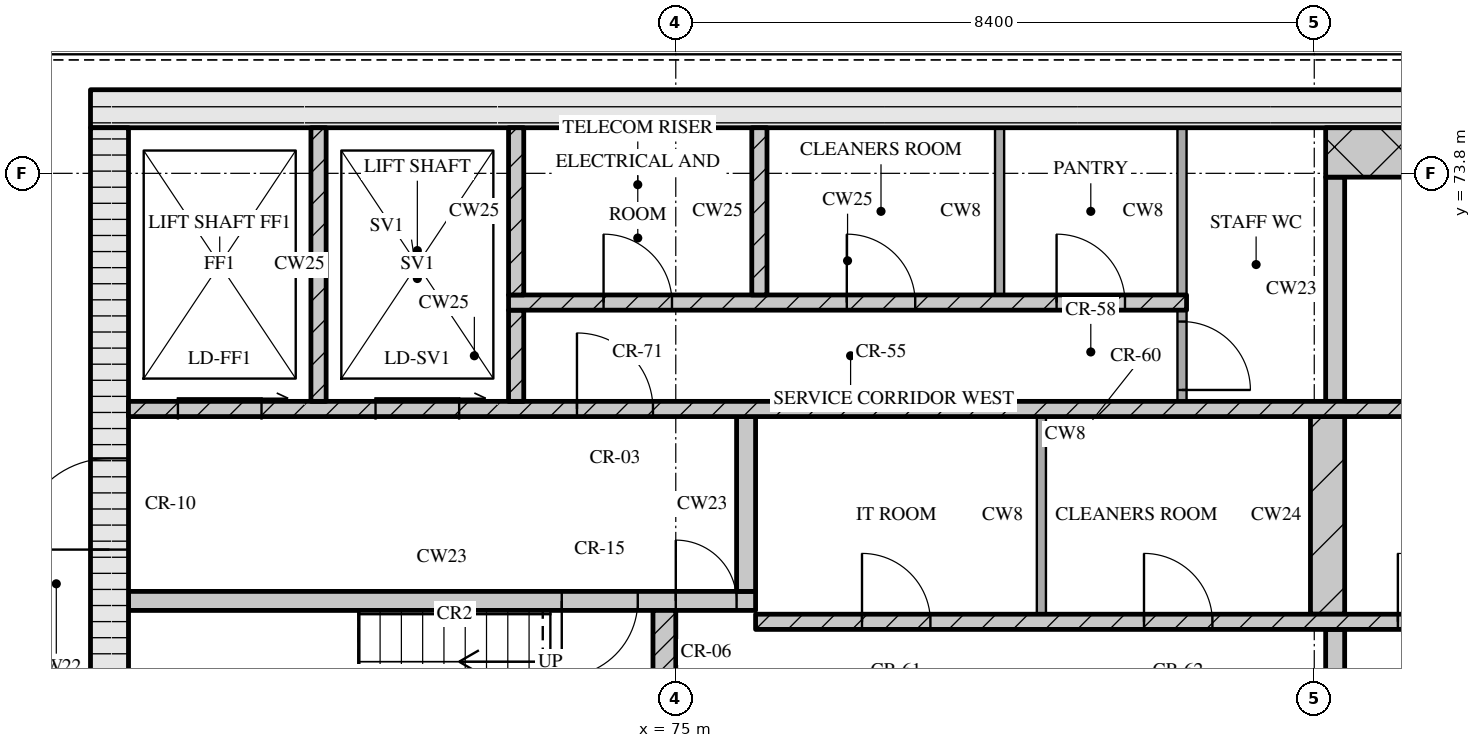
"""IFC4 building model, lengths in metres.
Left out: names, types, materials, properties, quantities, classifications, styles, units other than length and angle.
Written with IfcOpenShell. Run it as: python <this file> out.ifc"""

import sys

from ifc_helpers import new_model, si_unit, direction, frame, frame_2d, origin, place, context, subcontext, project, spatial, rectangle, extrude, element, fill, save


model = new_model("IFC4")
c1 = context("Model", 3, precision=1e-05, world=origin(), true_north=direction((0.0, 1.0)))
c2 = subcontext(c1, "Body", "Model", "MODEL_VIEW")
j1 = project(units=[si_unit("LENGTHUNIT", "METRE"), si_unit("PLANEANGLEUNIT", "RADIAN")], contexts=[c1])
p1 = place(None, origin())
s1 = spatial("IfcSite", under=j1, at=p1, CompositionType="ELEMENT")
p2 = place(p1, origin())
s2 = spatial("IfcBuilding", under=s1, at=p2, CompositionType="ELEMENT")
p3 = place(p2, frame((0.0, 0.0, 263.55)))
s3 = spatial("IfcBuildingStorey", under=s2, at=p3, CompositionType="ELEMENT", Elevation=263.55)
p4 = place(p3, frame((67.3, 74.65, 0.0), z_axis=(0.0, 0.0, 1.0), x_axis=(1.0, 0.0, 0.0)))
e1 = element("IfcWall", 1, at=p4, inside=s3, PredefinedType="SOLIDWALL", context=c2, shape_type="SweptSolid", body=[
    extrude(rectangle(XDim=40.6, YDim=0.5, at=frame_2d((20.3, 0.0))), origin(), (0.0, 0.0, 1.0), 3.32),
])
p5 = place(p3, frame((67.55, 62.4, 0.0), z_axis=(0.0, 0.0, 1.0), x_axis=(0.0, 1.0, 0.0)))
e2 = element("IfcWall", 2, at=p5, inside=s3, PredefinedType="SOLIDWALL", context=c2, shape_type="SweptSolid", body=[
    extrude(rectangle(XDim=12.0, YDim=0.5, at=frame_2d((6.0, 0.0))), origin(), (0.0, 0.0, 1.0), 3.32),
])
p6 = place(p5, frame((6.45, 0.0, 0.0)))
e3 = element("IfcOpeningElement", 3, at=p6, cuts=e2, PredefinedType="OPENING", context=c2, shape_type="SweptSolid", body=[
    extrude(rectangle(XDim=1.2, YDim=2.1, at=frame_2d((0.6, 1.05))), frame((0.0, 0.26, 0.0), z_axis=(0.0, -1.0, 0.0), x_axis=(1.0, 0.0, 0.0)), (0.0, 0.0, 1.0), 0.52),
])
p7 = place(p3, frame((74.85, 65.2, 0.0), z_axis=(0.0, 0.0, 1.0), x_axis=(0.0, 1.0, 0.0)))
e4 = element("IfcWall", 4, at=p7, inside=s3, PredefinedType="SOLIDWALL", context=c2, shape_type="SweptSolid", body=[
    extrude(rectangle(XDim=2.85, YDim=0.3, at=frame_2d((1.425, 0.0))), origin(), (0.0, 0.0, 1.0), 3.32),
])
p8 = place(p3, frame((83.675, 65.2, 0.0), z_axis=(0.0, 0.0, 1.0), x_axis=(0.0, 1.0, 0.0)))
e5 = element("IfcWall", 5, at=p8, inside=s3, PredefinedType="SOLIDWALL", context=c2, shape_type="SweptSolid", body=[
    extrude(rectangle(XDim=2.6, YDim=0.25, at=frame_2d((1.3, 0.0))), origin(), (0.0, 0.0, 1.0), 3.32),
])
p9 = place(p8, frame((0.7, 0.0, 0.0)))
e6 = element("IfcOpeningElement", 6, at=p9, cuts=e5, PredefinedType="OPENING", context=c2, shape_type="SweptSolid", body=[
    extrude(rectangle(XDim=1.2, YDim=2.1, at=frame_2d((0.6, 1.05))), frame((0.0, 0.135, 0.0), z_axis=(0.0, -1.0, 0.0), x_axis=(1.0, 0.0, 0.0)), (0.0, 0.0, 1.0), 0.27),
])
p10 = place(p3, frame((76.05, 67.9, 0.0), z_axis=(0.0, 0.0, 1.0), x_axis=(1.0, 0.0, 0.0)))
e7 = element("IfcWall", 7, at=p10, inside=s3, PredefinedType="SOLIDWALL", context=c2, shape_type="SweptSolid", body=[
    extrude(rectangle(XDim=23.1, YDim=0.2, at=frame_2d((11.55, 0.0))), origin(), (0.0, 0.0, 1.0), 3.32),
])
p11 = place(p10, frame((1.4, 0.0, 0.0)))
e8 = element("IfcOpeningElement", 8, at=p11, cuts=e7, PredefinedType="OPENING", context=c2, shape_type="SweptSolid", body=[
    extrude(rectangle(XDim=0.9, YDim=2.1, at=frame_2d((0.45, 1.05))), frame((0.0, 0.11, 0.0), z_axis=(0.0, -1.0, 0.0), x_axis=(1.0, 0.0, 0.0)), (0.0, 0.0, 1.0), 0.22),
])
p12 = place(p10, frame((5.11, 0.0, 0.0)))
e9 = element("IfcOpeningElement", 9, at=p12, cuts=e7, PredefinedType="OPENING", context=c2, shape_type="SweptSolid", body=[
    extrude(rectangle(XDim=0.9, YDim=2.1, at=frame_2d((0.45, 1.05))), frame((0.0, 0.11, 0.0), z_axis=(0.0, -1.0, 0.0), x_axis=(1.0, 0.0, 0.0)), (0.0, 0.0, 1.0), 0.22),
])
p13 = place(p10, frame((8.45, 0.0, 0.0)))
e10 = element("IfcOpeningElement", 10, at=p13, cuts=e7, PredefinedType="OPENING", context=c2, shape_type="SweptSolid", body=[
    extrude(rectangle(XDim=0.9, YDim=2.1, at=frame_2d((0.45, 1.05))), frame((0.0, 0.11, 0.0), z_axis=(0.0, -1.0, 0.0), x_axis=(1.0, 0.0, 0.0)), (0.0, 0.0, 1.0), 0.22),
])
p14 = place(p10, frame((10.91, 0.0, 0.0)))
e11 = element("IfcOpeningElement", 11, at=p14, cuts=e7, PredefinedType="OPENING", context=c2, shape_type="SweptSolid", body=[
    extrude(rectangle(XDim=0.9, YDim=2.1, at=frame_2d((0.45, 1.05))), frame((0.0, 0.11, 0.0), z_axis=(0.0, -1.0, 0.0), x_axis=(1.0, 0.0, 0.0)), (0.0, 0.0, 1.0), 0.22),
])
p15 = place(p10, frame((13.55, 0.0, 0.0)))
e12 = element("IfcOpeningElement", 12, at=p15, cuts=e7, PredefinedType="OPENING", context=c2, shape_type="SweptSolid", body=[
    extrude(rectangle(XDim=1.0, YDim=2.1, at=frame_2d((0.5, 1.05))), frame((0.0, 0.11, 0.0), z_axis=(0.0, -1.0, 0.0), x_axis=(1.0, 0.0, 0.0)), (0.0, 0.0, 1.0), 0.22),
])
p16 = place(p10, frame((16.2, 0.0, 0.0)))
e13 = element("IfcOpeningElement", 13, at=p16, cuts=e7, PredefinedType="OPENING", context=c2, shape_type="SweptSolid", body=[
    extrude(rectangle(XDim=1.1, YDim=2.1, at=frame_2d((0.55, 1.05))), frame((0.0, 0.11, 0.0), z_axis=(0.0, -1.0, 0.0), x_axis=(1.0, 0.0, 0.0)), (0.0, 0.0, 1.0), 0.22),
])
p17 = place(p10, frame((18.7, 0.0, 0.0)))
e14 = element("IfcOpeningElement", 14, at=p17, cuts=e7, PredefinedType="OPENING", context=c2, shape_type="SweptSolid", body=[
    extrude(rectangle(XDim=1.1, YDim=2.1, at=frame_2d((0.55, 1.05))), frame((0.0, 0.11, 0.0), z_axis=(0.0, -1.0, 0.0), x_axis=(1.0, 0.0, 0.0)), (0.0, 0.0, 1.0), 0.22),
])
p18 = place(p10, frame((21.2, 0.0, 0.0)))
e15 = element("IfcOpeningElement", 15, at=p18, cuts=e7, PredefinedType="OPENING", context=c2, shape_type="SweptSolid", body=[
    extrude(rectangle(XDim=1.1, YDim=2.1, at=frame_2d((0.55, 1.05))), frame((0.0, 0.11, 0.0), z_axis=(0.0, -1.0, 0.0), x_axis=(1.0, 0.0, 0.0)), (0.0, 0.0, 1.0), 0.22),
])
p19 = place(p3, frame((79.81, 68.0, 0.0), z_axis=(0.0, 0.0, 1.0), x_axis=(0.0, 1.0, 0.0)))
e16 = element("IfcWall", 16, at=p19, inside=s3, PredefinedType="PARTITIONING", context=c2, shape_type="SweptSolid", body=[
    extrude(rectangle(XDim=2.6, YDim=0.12, at=frame_2d((1.3, 0.0))), origin(), (0.0, 0.0, 1.0), 3.32),
])
p20 = place(p3, frame((83.575, 68.0, 0.0), z_axis=(0.0, 0.0, 1.0), x_axis=(0.0, 1.0, 0.0)))
e17 = element("IfcWall", 17, at=p20, inside=s3, PredefinedType="SOLIDWALL", context=c2, shape_type="SweptSolid", body=[
    extrude(rectangle(XDim=2.6, YDim=0.45, at=frame_2d((1.3, 0.0))), origin(), (0.0, 0.0, 1.0), 3.32),
])
p21 = place(p3, frame((67.8, 68.175, 0.0), z_axis=(0.0, 0.0, 1.0), x_axis=(1.0, 0.0, 0.0)))
e18 = element("IfcWall", 18, at=p21, inside=s3, PredefinedType="SOLIDWALL", context=c2, shape_type="SweptSolid", body=[
    extrude(rectangle(XDim=8.25, YDim=0.25, at=frame_2d((4.125, 0.0))), origin(), (0.0, 0.0, 1.0), 3.32),
])
p22 = place(p21, frame((5.7, 0.0, 0.0)))
e19 = element("IfcOpeningElement", 19, at=p22, cuts=e18, PredefinedType="OPENING", context=c2, shape_type="SweptSolid", body=[
    extrude(rectangle(XDim=1.0, YDim=2.1, at=frame_2d((0.5, 1.05))), frame((0.0, 0.135, 0.0), z_axis=(0.0, -1.0, 0.0), x_axis=(1.0, 0.0, 0.0)), (0.0, 0.0, 1.0), 0.27),
])
p23 = place(p21, frame((7.2, 0.0, 0.0)))
e20 = element("IfcOpeningElement", 20, at=p23, cuts=e18, PredefinedType="OPENING", context=c2, shape_type="SweptSolid", body=[
    extrude(rectangle(XDim=0.8, YDim=2.1, at=frame_2d((0.4, 1.05))), frame((0.0, 0.135, 0.0), z_axis=(0.0, -1.0, 0.0), x_axis=(1.0, 0.0, 0.0)), (0.0, 0.0, 1.0), 0.27),
])
p24 = place(p3, frame((75.925, 68.3, 0.0), z_axis=(0.0, 0.0, 1.0), x_axis=(0.0, 1.0, 0.0)))
e21 = element("IfcWall", 21, at=p24, inside=s3, PredefinedType="SOLIDWALL", context=c2, shape_type="SweptSolid", body=[
    extrude(rectangle(XDim=2.3, YDim=0.25, at=frame_2d((1.15, 0.0))), origin(), (0.0, 0.0, 1.0), 3.32),
])
p25 = place(p3, frame((67.8, 70.7, 0.0), z_axis=(0.0, 0.0, 1.0), x_axis=(1.0, 0.0, 0.0)))
e22 = element("IfcWall", 22, at=p25, inside=s3, PredefinedType="SOLIDWALL", context=c2, shape_type="SweptSolid", body=[
    extrude(rectangle(XDim=39.6, YDim=0.2, at=frame_2d((19.8, 0.0))), origin(), (0.0, 0.0, 1.0), 3.32),
])
p26 = place(p25, frame((0.65, 0.0, 0.0)))
e23 = element("IfcOpeningElement", 23, at=p26, cuts=e22, PredefinedType="OPENING", context=c2, shape_type="SweptSolid", body=[
    extrude(rectangle(XDim=1.1, YDim=2.1, at=frame_2d((0.55, 1.05))), frame((0.0, 0.11, 0.0), z_axis=(0.0, -1.0, 0.0), x_axis=(1.0, 0.0, 0.0)), (0.0, 0.0, 1.0), 0.22),
])
p27 = place(p25, frame((3.25, 0.0, 0.0)))
e24 = element("IfcOpeningElement", 24, at=p27, cuts=e22, PredefinedType="OPENING", context=c2, shape_type="SweptSolid", body=[
    extrude(rectangle(XDim=1.1, YDim=2.1, at=frame_2d((0.55, 1.05))), frame((0.0, 0.11, 0.0), z_axis=(0.0, -1.0, 0.0), x_axis=(1.0, 0.0, 0.0)), (0.0, 0.0, 1.0), 0.22),
])
p28 = place(p25, frame((5.9, 0.0, 0.0)))
e25 = element("IfcOpeningElement", 25, at=p28, cuts=e22, PredefinedType="OPENING", context=c2, shape_type="SweptSolid", body=[
    extrude(rectangle(XDim=1.0, YDim=2.1, at=frame_2d((0.5, 1.05))), frame((0.0, 0.11, 0.0), z_axis=(0.0, -1.0, 0.0), x_axis=(1.0, 0.0, 0.0)), (0.0, 0.0, 1.0), 0.22),
])
p29 = place(p25, frame((21.7, 0.0, 0.0)))
e26 = element("IfcOpeningElement", 26, at=p29, cuts=e22, PredefinedType="OPENING", context=c2, shape_type="SweptSolid", body=[
    extrude(rectangle(XDim=1.0, YDim=2.1, at=frame_2d((0.5, 1.05))), frame((0.0, 0.11, 0.0), z_axis=(0.0, -1.0, 0.0), x_axis=(1.0, 0.0, 0.0)), (0.0, 0.0, 1.0), 0.22),
])
p30 = place(p25, frame((32.7, 0.0, 0.0)))
e27 = element("IfcOpeningElement", 27, at=p30, cuts=e22, PredefinedType="OPENING", context=c2, shape_type="SweptSolid", body=[
    extrude(rectangle(XDim=1.0, YDim=2.1, at=frame_2d((0.5, 1.05))), frame((0.0, 0.11, 0.0), z_axis=(0.0, -1.0, 0.0), x_axis=(1.0, 0.0, 0.0)), (0.0, 0.0, 1.0), 0.22),
])
p31 = place(p25, frame((35.25, 0.0, 0.0)))
e28 = element("IfcOpeningElement", 28, at=p31, cuts=e22, PredefinedType="OPENING", context=c2, shape_type="SweptSolid", body=[
    extrude(rectangle(XDim=1.1, YDim=2.1, at=frame_2d((0.55, 1.05))), frame((0.0, 0.11, 0.0), z_axis=(0.0, -1.0, 0.0), x_axis=(1.0, 0.0, 0.0)), (0.0, 0.0, 1.0), 0.22),
])
p32 = place(p25, frame((37.85, 0.0, 0.0)))
e29 = element("IfcOpeningElement", 29, at=p32, cuts=e22, PredefinedType="OPENING", context=c2, shape_type="SweptSolid", body=[
    extrude(rectangle(XDim=1.1, YDim=2.1, at=frame_2d((0.55, 1.05))), frame((0.0, 0.11, 0.0), z_axis=(0.0, -1.0, 0.0), x_axis=(1.0, 0.0, 0.0)), (0.0, 0.0, 1.0), 0.22),
])
p33 = place(p3, frame((70.3, 70.8, 0.0), z_axis=(0.0, 0.0, 1.0), x_axis=(0.0, 1.0, 0.0)))
e30 = element("IfcWall", 30, at=p33, inside=s3, PredefinedType="SOLIDWALL", context=c2, shape_type="SweptSolid", body=[
    extrude(rectangle(XDim=3.6, YDim=0.2, at=frame_2d((1.8, 0.0))), origin(), (0.0, 0.0, 1.0), 3.32),
])
p34 = place(p3, frame((72.9, 70.8, 0.0), z_axis=(0.0, 0.0, 1.0), x_axis=(0.0, 1.0, 0.0)))
e31 = element("IfcWall", 31, at=p34, inside=s3, PredefinedType="SOLIDWALL", context=c2, shape_type="SweptSolid", body=[
    extrude(rectangle(XDim=1.2, YDim=0.2, at=frame_2d((0.6, 0.0))), origin(), (0.0, 0.0, 1.0), 3.32),
])
p35 = place(p3, frame((81.66, 70.8, 0.0), z_axis=(0.0, 0.0, 1.0), x_axis=(0.0, 1.0, 0.0)))
e32 = element("IfcWall", 32, at=p35, inside=s3, PredefinedType="PARTITIONING", context=c2, shape_type="SweptSolid", body=[
    extrude(rectangle(XDim=1.2, YDim=0.12, at=frame_2d((0.6, 0.0))), origin(), (0.0, 0.0, 1.0), 3.32),
])
p36 = place(p35, frame((0.15, 0.0, 0.0)))
e33 = element("IfcOpeningElement", 33, at=p36, cuts=e32, PredefinedType="OPENING", context=c2, shape_type="SweptSolid", body=[
    extrude(rectangle(XDim=0.9, YDim=2.1, at=frame_2d((0.45, 1.05))), frame((0.0, 0.07, 0.0), z_axis=(0.0, -1.0, 0.0), x_axis=(1.0, 0.0, 0.0)), (0.0, 0.0, 1.0), 0.14),
])
p37 = place(p3, frame((83.675, 70.8, 0.0), z_axis=(0.0, 0.0, 1.0), x_axis=(0.0, 1.0, 0.0)))
e34 = element("IfcWall", 34, at=p37, inside=s3, PredefinedType="SOLIDWALL", context=c2, shape_type="SweptSolid", body=[
    extrude(rectangle(XDim=2.95, YDim=0.25, at=frame_2d((1.475, 0.0))), origin(), (0.0, 0.0, 1.0), 3.32),
])
p38 = place(p3, frame((72.8, 72.1, 0.0), z_axis=(0.0, 0.0, 1.0), x_axis=(1.0, 0.0, 0.0)))
e35 = element("IfcWall", 35, at=p38, inside=s3, PredefinedType="SOLIDWALL", context=c2, shape_type="SweptSolid", body=[
    extrude(rectangle(XDim=8.92, YDim=0.2, at=frame_2d((4.46, 0.0))), origin(), (0.0, 0.0, 1.0), 3.32),
])
p39 = place(p38, frame((1.25, 0.0, 0.0)))
e36 = element("IfcOpeningElement", 36, at=p39, cuts=e35, PredefinedType="OPENING", context=c2, shape_type="SweptSolid", body=[
    extrude(rectangle(XDim=0.9, YDim=2.1, at=frame_2d((0.45, 1.05))), frame((0.0, 0.11, 0.0), z_axis=(0.0, -1.0, 0.0), x_axis=(1.0, 0.0, 0.0)), (0.0, 0.0, 1.0), 0.22),
])
p40 = place(p38, frame((4.45, 0.0, 0.0)))
e37 = element("IfcOpeningElement", 37, at=p40, cuts=e35, PredefinedType="OPENING", context=c2, shape_type="SweptSolid", body=[
    extrude(rectangle(XDim=0.9, YDim=2.1, at=frame_2d((0.45, 1.05))), frame((0.0, 0.11, 0.0), z_axis=(0.0, -1.0, 0.0), x_axis=(1.0, 0.0, 0.0)), (0.0, 0.0, 1.0), 0.22),
])
p41 = place(p38, frame((7.21, 0.0, 0.0)))
e38 = element("IfcOpeningElement", 38, at=p41, cuts=e35, PredefinedType="OPENING", context=c2, shape_type="SweptSolid", body=[
    extrude(rectangle(XDim=0.9, YDim=2.1, at=frame_2d((0.45, 1.05))), frame((0.0, 0.11, 0.0), z_axis=(0.0, -1.0, 0.0), x_axis=(1.0, 0.0, 0.0)), (0.0, 0.0, 1.0), 0.22),
])
for number, where, z_axis, x_axis in (
    (39, (72.9, 72.2, 0.0), (0.0, 0.0, 1.0), (0.0, 1.0, 0.0)),
    (40, (76.1, 72.2, 0.0), (0.0, 0.0, 1.0), (0.0, 1.0, 0.0)),
):
    element("IfcWall", number, at=place(p3, frame(where, z_axis=z_axis, x_axis=x_axis)), inside=s3, PredefinedType="SOLIDWALL", context=c2, shape_type="SweptSolid", body=[
        extrude(rectangle(XDim=2.2, YDim=0.2, at=frame_2d((1.1, 0.0))), origin(), (0.0, 0.0, 1.0), 3.32),
    ])
for number, where, z_axis, x_axis in (
    (41, (79.26, 72.2, 0.0), (0.0, 0.0, 1.0), (0.0, 1.0, 0.0)),
    (42, (81.66, 72.2, 0.0), (0.0, 0.0, 1.0), (0.0, 1.0, 0.0)),
):
    element("IfcWall", number, at=place(p3, frame(where, z_axis=z_axis, x_axis=x_axis)), inside=s3, PredefinedType="PARTITIONING", context=c2, shape_type="SweptSolid", body=[
        extrude(rectangle(XDim=2.2, YDim=0.12, at=frame_2d((1.1, 0.0))), origin(), (0.0, 0.0, 1.0), 3.32),
    ])
p42 = place(p3, frame((83.55, 74.075, 0.0), z_axis=(0.0, 0.0, 1.0), x_axis=(1.0, 0.0, 0.0)))
e43 = element("IfcWall", 43, at=p42, inside=s3, PredefinedType="SOLIDWALL", context=c2, shape_type="SweptSolid", body=[
    extrude(rectangle(XDim=8.1, YDim=0.65, at=frame_2d((4.05, 0.0))), origin(), (0.0, 0.0, 1.0), 3.32),
])
p43 = place(p11, origin())
e44 = element("IfcDoor", 44, at=p43, inside=s3, OperationType="SINGLE_SWING_LEFT", PredefinedType="DOOR", context=c2, shape_type="SweptSolid", body=[
    extrude(rectangle(XDim=0.9, YDim=2.1, at=frame_2d((0.45, 1.05))), frame((0.0, 0.025, 0.0), z_axis=(0.0, -1.0, 0.0), x_axis=(1.0, 0.0, 0.0)), (0.0, 0.0, 1.0), 0.05),
])
fill(e8, e44)
p44 = place(p12, origin())
e45 = element("IfcDoor", 45, at=p44, inside=s3, OperationType="SINGLE_SWING_LEFT", PredefinedType="DOOR", context=c2, shape_type="SweptSolid", body=[
    extrude(rectangle(XDim=0.9, YDim=2.1, at=frame_2d((0.45, 1.05))), frame((0.0, 0.025, 0.0), z_axis=(0.0, -1.0, 0.0), x_axis=(1.0, 0.0, 0.0)), (0.0, 0.0, 1.0), 0.05),
])
fill(e9, e45)
p45 = place(p13, origin())
e46 = element("IfcDoor", 46, at=p45, inside=s3, OperationType="SINGLE_SWING_LEFT", PredefinedType="DOOR", context=c2, shape_type="SweptSolid", body=[
    extrude(rectangle(XDim=0.9, YDim=2.1, at=frame_2d((0.45, 1.05))), frame((0.0, 0.025, 0.0), z_axis=(0.0, -1.0, 0.0), x_axis=(1.0, 0.0, 0.0)), (0.0, 0.0, 1.0), 0.05),
])
fill(e10, e46)
p46 = place(p22, origin())
e47 = element("IfcDoor", 47, at=p46, inside=s3, OperationType="SINGLE_SWING_RIGHT", PredefinedType="DOOR", context=c2, shape_type="SweptSolid", body=[
    extrude(rectangle(XDim=1.0, YDim=2.1, at=frame_2d((0.5, 1.05))), frame((0.0, 0.025, 0.0), z_axis=(0.0, -1.0, 0.0), x_axis=(1.0, 0.0, 0.0)), (0.0, 0.0, 1.0), 0.05),
])
fill(e19, e47)
p47 = place(p23, origin())
e48 = element("IfcDoor", 48, at=p47, inside=s3, OperationType="SINGLE_SWING_LEFT", PredefinedType="DOOR", context=c2, shape_type="SweptSolid", body=[
    extrude(rectangle(XDim=0.8, YDim=2.1, at=frame_2d((0.4, 1.05))), frame((0.0, 0.025, 0.0), z_axis=(0.0, -1.0, 0.0), x_axis=(1.0, 0.0, 0.0)), (0.0, 0.0, 1.0), 0.05),
])
fill(e20, e48)
p48 = place(p6, origin())
e49 = element("IfcDoor", 49, at=p48, inside=s3, OperationType="SINGLE_SWING_LEFT", PredefinedType="DOOR", context=c2, shape_type="SweptSolid", body=[
    extrude(rectangle(XDim=1.2, YDim=2.1, at=frame_2d((0.6, 1.05))), frame((0.0, 0.025, 0.0), z_axis=(0.0, -1.0, 0.0), x_axis=(1.0, 0.0, 0.0)), (0.0, 0.0, 1.0), 0.05),
])
fill(e3, e49)
p49 = place(p26, origin())
e50 = element("IfcDoor", 50, at=p49, inside=s3, OperationType="SLIDING_TO_RIGHT", PredefinedType="DOOR", context=c2, shape_type="SweptSolid", body=[
    extrude(rectangle(XDim=1.1, YDim=2.1, at=frame_2d((0.55, 1.05))), frame((0.0, 0.025, 0.0), z_axis=(0.0, -1.0, 0.0), x_axis=(1.0, 0.0, 0.0)), (0.0, 0.0, 1.0), 0.05),
])
fill(e23, e50)
p50 = place(p27, origin())
e51 = element("IfcDoor", 51, at=p50, inside=s3, OperationType="SLIDING_TO_RIGHT", PredefinedType="DOOR", context=c2, shape_type="SweptSolid", body=[
    extrude(rectangle(XDim=1.1, YDim=2.1, at=frame_2d((0.55, 1.05))), frame((0.0, 0.025, 0.0), z_axis=(0.0, -1.0, 0.0), x_axis=(1.0, 0.0, 0.0)), (0.0, 0.0, 1.0), 0.05),
])
fill(e24, e51)
p51 = place(p28, origin())
e52 = element("IfcDoor", 52, at=p51, inside=s3, OperationType="SINGLE_SWING_LEFT", PredefinedType="DOOR", context=c2, shape_type="SweptSolid", body=[
    extrude(rectangle(XDim=1.0, YDim=2.1, at=frame_2d((0.5, 1.05))), frame((0.0, 0.025, 0.0), z_axis=(0.0, -1.0, 0.0), x_axis=(1.0, 0.0, 0.0)), (0.0, 0.0, 1.0), 0.05),
])
fill(e25, e52)
p52 = place(p36, origin())
e53 = element("IfcDoor", 53, at=p52, inside=s3, OperationType="SINGLE_SWING_RIGHT", PredefinedType="DOOR", context=c2, shape_type="SweptSolid", body=[
    extrude(rectangle(XDim=0.9, YDim=2.1, at=frame_2d((0.45, 1.05))), frame((0.0, 0.025, 0.0), z_axis=(0.0, -1.0, 0.0), x_axis=(1.0, 0.0, 0.0)), (0.0, 0.0, 1.0), 0.05),
])
fill(e33, e53)
p53 = place(p39, origin())
e54 = element("IfcDoor", 54, at=p53, inside=s3, OperationType="SINGLE_SWING_LEFT", PredefinedType="DOOR", context=c2, shape_type="SweptSolid", body=[
    extrude(rectangle(XDim=0.9, YDim=2.1, at=frame_2d((0.45, 1.05))), frame((0.0, 0.025, 0.0), z_axis=(0.0, -1.0, 0.0), x_axis=(1.0, 0.0, 0.0)), (0.0, 0.0, 1.0), 0.05),
])
fill(e36, e54)
p54 = place(p40, origin())
e55 = element("IfcDoor", 55, at=p54, inside=s3, OperationType="SINGLE_SWING_LEFT", PredefinedType="DOOR", context=c2, shape_type="SweptSolid", body=[
    extrude(rectangle(XDim=0.9, YDim=2.1, at=frame_2d((0.45, 1.05))), frame((0.0, 0.025, 0.0), z_axis=(0.0, -1.0, 0.0), x_axis=(1.0, 0.0, 0.0)), (0.0, 0.0, 1.0), 0.05),
])
fill(e37, e55)
p55 = place(p41, origin())
e56 = element("IfcDoor", 56, at=p55, inside=s3, OperationType="SINGLE_SWING_LEFT", PredefinedType="DOOR", context=c2, shape_type="SweptSolid", body=[
    extrude(rectangle(XDim=0.9, YDim=2.1, at=frame_2d((0.45, 1.05))), frame((0.0, 0.025, 0.0), z_axis=(0.0, -1.0, 0.0), x_axis=(1.0, 0.0, 0.0)), (0.0, 0.0, 1.0), 0.05),
])
fill(e38, e56)
save(model, sys.argv[1])
